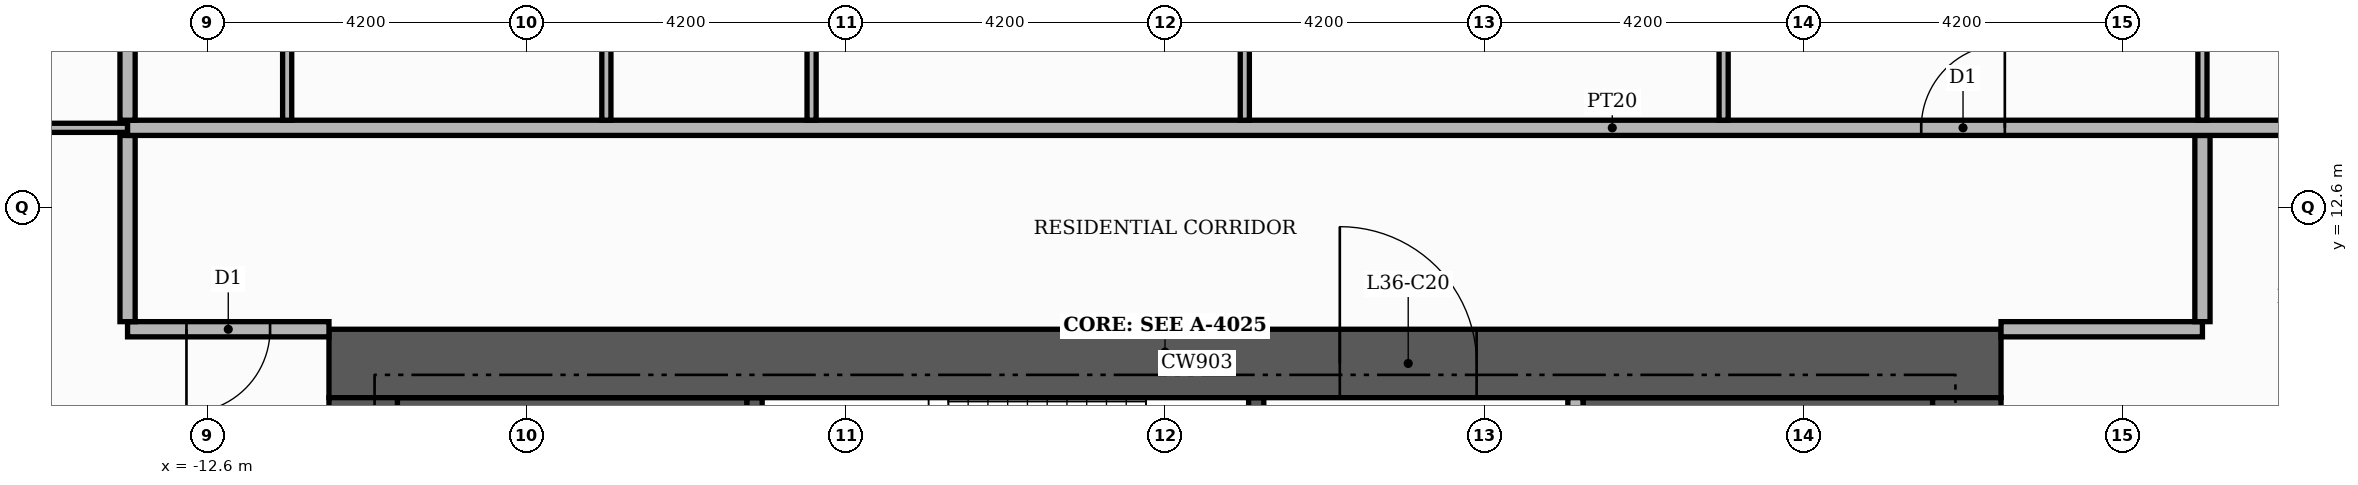
"""IFC4 building model, lengths in metres.
Left out: names, types, materials, properties, quantities, classifications, styles, units other than length and angle.
Written with IfcOpenShell. Run it as: python <this file> out.ifc"""

import sys

from ifc_helpers import new_model, si_unit, direction, frame, frame_2d, origin, place, context, subcontext, project, spatial, rectangle, extrude, element, fill, save


model = new_model("IFC4")
c1 = context("Model", 3, precision=1e-05, world=origin(), true_north=direction((0.0, 1.0)))
c2 = subcontext(c1, "Body", "Model", "MODEL_VIEW")
j1 = project(units=[si_unit("LENGTHUNIT", "METRE"), si_unit("PLANEANGLEUNIT", "RADIAN")], contexts=[c1])
p1 = place(None, origin())
s1 = spatial("IfcSite", under=j1, at=p1, CompositionType="ELEMENT")
p2 = place(p1, origin())
s2 = spatial("IfcBuilding", under=s1, at=p2, CompositionType="ELEMENT")
p3 = place(p2, frame((0.0, 0.0, 153.3)))
s3 = spatial("IfcBuildingStorey", under=s2, at=p3, CompositionType="ELEMENT", Elevation=153.3)
for number, where, z_axis, x_axis in (
    (1, (-10.1, 9.15, 0.0), (0.0, 0.0, 1.0), (1.0, 0.0, 0.0)),
    (2, (5.5, 9.15, 0.0), (0.0, 0.0, 1.0), (1.0, 0.0, 0.0)),
):
    element("IfcWall", number, at=place(p3, frame(where, z_axis=z_axis, x_axis=x_axis)), inside=s3, PredefinedType="SHEAR", context=c2, shape_type="SweptSolid", body=[
        extrude(rectangle(XDim=4.6, YDim=1.9, at=frame_2d((2.3, 0.0))), origin(), (0.0, 0.0, 1.0), 3.48),
    ])
p4 = place(p3, frame((-5.4, 7.25, 0.0), z_axis=(0.0, 0.0, 1.0), x_axis=(0.0, 1.0, 0.0)))
e3 = element("IfcWall", 3, at=p4, inside=s3, PredefinedType="SHEAR", context=c2, shape_type="SweptSolid", body=[
    extrude(rectangle(XDim=2.85, YDim=0.2, at=frame_2d((1.425, 0.0))), origin(), (0.0, 0.0, 1.0), 3.48),
])
p5 = place(p3, frame((1.2, 7.25, 0.0), z_axis=(0.0, 0.0, 1.0), x_axis=(0.0, 1.0, 0.0)))
e4 = element("IfcWall", 4, at=p5, inside=s3, PredefinedType="SHEAR", context=c2, shape_type="SweptSolid", body=[
    extrude(rectangle(XDim=2.85, YDim=0.2, at=frame_2d((1.425, 0.0))), origin(), (0.0, 0.0, 1.0), 3.48),
])
p6 = place(p5, frame((0.85, 0.0, 0.0)))
e5 = element("IfcOpeningElement", 5, at=p6, cuts=e4, PredefinedType="OPENING", context=c2, shape_type="SweptSolid", body=[
    extrude(rectangle(XDim=1.0, YDim=2.1, at=frame_2d((0.5, 1.05))), frame((0.0, 0.11, 0.0), z_axis=(0.0, -1.0, 0.0), x_axis=(1.0, 0.0, 0.0)), (0.0, 0.0, 1.0), 0.22),
])
p7 = place(p3, frame((-11.0, 10.55, 0.0), z_axis=(0.0, 0.0, 1.0), x_axis=(1.0, 0.0, 0.0)))
e6 = element("IfcWall", 6, at=p7, inside=s3, PredefinedType="SHEAR", context=c2, shape_type="SweptSolid", body=[
    extrude(rectangle(XDim=22.0, YDim=0.9, at=frame_2d((11.0, 0.0))), origin(), (0.0, 0.0, 1.0), 3.48),
])
p8 = place(p7, frame((13.3, 0.0, 0.0)))
e7 = element("IfcOpeningElement", 7, at=p8, cuts=e6, PredefinedType="OPENING", context=c2, shape_type="SweptSolid", body=[
    extrude(rectangle(XDim=1.8, YDim=2.2, at=frame_2d((0.9, 1.1))), frame((0.0, 0.46, 0.0), z_axis=(0.0, -1.0, 0.0), x_axis=(1.0, 0.0, 0.0)), (0.0, 0.0, 1.0), 0.92),
])
for number, where, z_axis, x_axis in (
    (8, (-10.55, -10.1, 0.0), (0.0, 0.0, 1.0), (0.0, 1.0, 0.0)),
    (9, (10.55, -10.1, 0.0), (0.0, 0.0, 1.0), (0.0, 1.0, 0.0)),
):
    element("IfcWall", number, at=place(p3, frame(where, z_axis=z_axis, x_axis=x_axis)), inside=s3, PredefinedType="SHEAR", context=c2, shape_type="SweptSolid", body=[
        extrude(rectangle(XDim=20.2, YDim=0.9, at=frame_2d((10.1, 0.0))), origin(), (0.0, 0.0, 1.0), 3.48),
    ])
p9 = place(p3, frame((5.4, 5.5, 0.0), z_axis=(0.0, 0.0, 1.0), x_axis=(0.0, 1.0, 0.0)))
e10 = element("IfcWall", 10, at=p9, inside=s3, PredefinedType="PARTITIONING", context=c2, shape_type="SweptSolid", body=[
    extrude(rectangle(XDim=4.6, YDim=0.2, at=frame_2d((2.3, 0.0))), origin(), (0.0, 0.0, 1.0), 3.48),
])
p10 = place(p9, frame((0.25, 0.0, 0.0)))
e11 = element("IfcOpeningElement", 11, at=p10, cuts=e10, PredefinedType="OPENING", context=c2, shape_type="SweptSolid", body=[
    extrude(rectangle(XDim=1.0, YDim=2.1, at=frame_2d((0.5, 1.05))), frame((0.0, 0.11, 0.0), z_axis=(0.0, -1.0, 0.0), x_axis=(1.0, 0.0, 0.0)), (0.0, 0.0, 1.0), 0.22),
])
p11 = place(p3, frame((-13.65, 11.0, 0.0), z_axis=(0.0, 0.0, 1.0), x_axis=(1.0, 0.0, 0.0)))
e12 = element("IfcWall", 12, at=p11, inside=s3, PredefinedType="PARTITIONING", context=c2, shape_type="SweptSolid", body=[
    extrude(rectangle(XDim=2.65, YDim=0.2, at=frame_2d((1.325, 0.0))), origin(), (0.0, 0.0, 1.0), 3.48),
])
p12 = place(p11, frame((0.775, 0.0, 0.0)))
e13 = element("IfcOpeningElement", 13, at=p12, cuts=e12, PredefinedType="OPENING", context=c2, shape_type="SweptSolid", body=[
    extrude(rectangle(XDim=1.1, YDim=2.4, at=frame_2d((0.55, 1.2))), frame((0.0, 0.11, 0.0), z_axis=(0.0, -1.0, 0.0), x_axis=(1.0, 0.0, 0.0)), (0.0, 0.0, 1.0), 0.22),
])
p13 = place(p3, frame((11.0, 11.0, 0.0), z_axis=(0.0, 0.0, 1.0), x_axis=(1.0, 0.0, 0.0)))
e14 = element("IfcWall", 14, at=p13, inside=s3, PredefinedType="PARTITIONING", context=c2, shape_type="SweptSolid", body=[
    extrude(rectangle(XDim=2.65, YDim=0.2, at=frame_2d((1.325, 0.0))), origin(), (0.0, 0.0, 1.0), 3.48),
])
for number, where, z_axis, x_axis in (
    (15, (-13.65, 11.1, 0.0), (0.0, 0.0, 1.0), (0.0, 1.0, 0.0)),
    (16, (13.65, 11.1, 0.0), (0.0, 0.0, 1.0), (0.0, 1.0, 0.0)),
):
    element("IfcWall", number, at=place(p3, frame(where, z_axis=z_axis, x_axis=x_axis)), inside=s3, PredefinedType="PARTITIONING", context=c2, shape_type="SweptSolid", body=[
        extrude(rectangle(XDim=2.45, YDim=0.2, at=frame_2d((1.225, 0.0))), origin(), (0.0, 0.0, 1.0), 3.48),
    ])
p14 = place(p3, frame((-20.12, 13.65, 0.0), z_axis=(0.0, 0.0, 1.0), x_axis=(1.0, 0.0, 0.0)))
e17 = element("IfcWall", 17, at=p14, inside=s3, PredefinedType="PARTITIONING", context=c2, shape_type="SweptSolid", body=[
    extrude(rectangle(XDim=6.47, YDim=0.12, at=frame_2d((3.235, 0.0))), origin(), (0.0, 0.0, 1.0), 3.48),
])
p15 = place(p14, frame((2.785, 0.0, 0.0)))
e18 = element("IfcOpeningElement", 18, at=p15, cuts=e17, PredefinedType="OPENING", context=c2, shape_type="SweptSolid", body=[
    extrude(rectangle(XDim=0.9, YDim=2.1, at=frame_2d((0.45, 1.05))), frame((0.0, 0.07, 0.0), z_axis=(0.0, -1.0, 0.0), x_axis=(1.0, 0.0, 0.0)), (0.0, 0.0, 1.0), 0.14),
])
p16 = place(p3, frame((-13.65, 13.65, 0.0), z_axis=(0.0, 0.0, 1.0), x_axis=(1.0, 0.0, 0.0)))
e19 = element("IfcWall", 19, at=p16, inside=s3, PredefinedType="PARTITIONING", context=c2, shape_type="SweptSolid", body=[
    extrude(rectangle(XDim=39.07, YDim=0.2, at=frame_2d((19.535, 0.0))), origin(), (0.0, 0.0, 1.0), 3.48),
])
p17 = place(p16, frame((23.6, 0.0, 0.0)))
e20 = element("IfcOpeningElement", 20, at=p17, cuts=e19, PredefinedType="OPENING", context=c2, shape_type="SweptSolid", body=[
    extrude(rectangle(XDim=1.1, YDim=2.4, at=frame_2d((0.55, 1.2))), frame((0.0, 0.11, 0.0), z_axis=(0.0, -1.0, 0.0), x_axis=(1.0, 0.0, 0.0)), (0.0, 0.0, 1.0), 0.22),
])
p18 = place(p3, frame((-13.65, 13.75, 0.0), z_axis=(0.0, 0.0, 1.0), x_axis=(0.0, 1.0, 0.0)))
e21 = element("IfcWall", 21, at=p18, inside=s3, PredefinedType="PARTITIONING", context=c2, shape_type="SweptSolid", body=[
    extrude(rectangle(XDim=11.67, YDim=0.2, at=frame_2d((5.835, 0.0))), origin(), (0.0, 0.0, 1.0), 3.48),
])
for number, where, z_axis, x_axis in (
    (22, (-11.55, 13.75, 0.0), (0.0, 0.0, 1.0), (0.0, 1.0, 0.0)),
    (23, (-7.35, 13.75, 0.0), (0.0, 0.0, 1.0), (0.0, 1.0, 0.0)),
    (24, (-4.65, 13.75, 0.0), (0.0, 0.0, 1.0), (0.0, 1.0, 0.0)),
    (25, (1.05, 13.75, 0.0), (0.0, 0.0, 1.0), (0.0, 1.0, 0.0)),
    (26, (7.35, 13.75, 0.0), (0.0, 0.0, 1.0), (0.0, 1.0, 0.0)),
):
    element("IfcWall", number, at=place(p3, frame(where, z_axis=z_axis, x_axis=x_axis)), inside=s3, PredefinedType="PARTITIONING", context=c2, shape_type="SweptSolid", body=[
        extrude(rectangle(XDim=5.11, YDim=0.12, at=frame_2d((2.555, 0.0))), origin(), (0.0, 0.0, 1.0), 3.48),
    ])
p19 = place(p3, frame((13.65, 13.75, 0.0), z_axis=(0.0, 0.0, 1.0), x_axis=(0.0, 1.0, 0.0)))
e27 = element("IfcWall", 27, at=p19, inside=s3, PredefinedType="PARTITIONING", context=c2, shape_type="SweptSolid", body=[
    extrude(rectangle(XDim=6.61, YDim=0.12, at=frame_2d((3.305, 0.0))), origin(), (0.0, 0.0, 1.0), 3.48),
])
p20 = place(p19, frame((2.835, 0.0, 0.0)))
e28 = element("IfcOpeningElement", 28, at=p20, cuts=e27, PredefinedType="OPENING", context=c2, shape_type="SweptSolid", body=[
    extrude(rectangle(XDim=0.9, YDim=2.1, at=frame_2d((0.45, 1.05))), frame((0.0, 0.07, 0.0), z_axis=(0.0, -1.0, 0.0), x_axis=(1.0, 0.0, 0.0)), (0.0, 0.0, 1.0), 0.14),
])
p21 = place(p8, origin())
e29 = element("IfcDoor", 29, at=p21, inside=s3, OperationType="DOUBLE_DOOR_SINGLE_SWING", PredefinedType="DOOR", context=c2, shape_type="SweptSolid", body=[
    extrude(rectangle(XDim=1.8, YDim=2.2, at=frame_2d((0.9, 1.1))), frame((0.0, 0.025, 0.0), z_axis=(0.0, -1.0, 0.0), x_axis=(1.0, 0.0, 0.0)), (0.0, 0.0, 1.0), 0.05),
])
fill(e7, e29)
p22 = place(p17, origin())
e30 = element("IfcDoor", 30, at=p22, inside=s3, OperationType="SINGLE_SWING_RIGHT", PredefinedType="DOOR", context=c2, shape_type="SweptSolid", body=[
    extrude(rectangle(XDim=1.1, YDim=2.4, at=frame_2d((0.55, 1.2))), frame((0.0, 0.025, 0.0), z_axis=(0.0, -1.0, 0.0), x_axis=(1.0, 0.0, 0.0)), (0.0, 0.0, 1.0), 0.05),
])
fill(e20, e30)
p23 = place(p12, frame((1.1, 0.0, 0.0), z_axis=(0.0, 0.0, 1.0), x_axis=(-1.0, 0.0, 0.0)))
e31 = element("IfcDoor", 31, at=p23, inside=s3, OperationType="SINGLE_SWING_LEFT", PredefinedType="DOOR", context=c2, shape_type="SweptSolid", body=[
    extrude(rectangle(XDim=1.1, YDim=2.4, at=frame_2d((0.55, 1.2))), frame((0.0, 0.025, 0.0), z_axis=(0.0, -1.0, 0.0), x_axis=(1.0, 0.0, 0.0)), (0.0, 0.0, 1.0), 0.05),
])
fill(e13, e31)
save(model, sys.argv[1])
